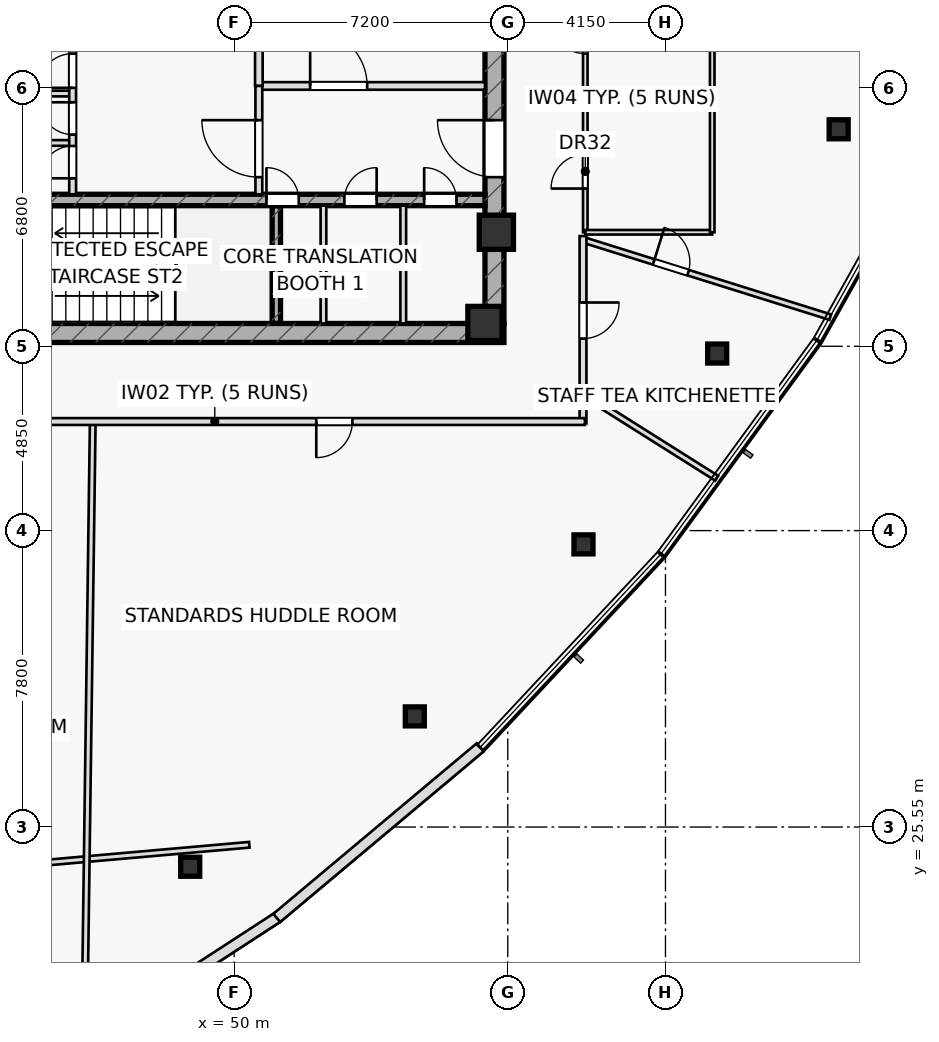
"""IFC4 building model, lengths in metres.
Left out: names, types, materials, properties, quantities, classifications, styles, units other than length and angle.
Written with IfcOpenShell. Run it as: python <this file> out.ifc"""

import sys

from ifc_helpers import new_model, si_unit, direction, frame, frame_2d, origin, origin_2d, place, context, subcontext, project, spatial, rectangle, hollow_rectangle, extrude, element, fill, save


model = new_model("IFC4")
c1 = context("Model", 3, precision=1e-05, world=origin(), true_north=direction((0.0, 1.0)))
c2 = subcontext(c1, "Body", "Model", "MODEL_VIEW")
j1 = project(units=[si_unit("LENGTHUNIT", "METRE"), si_unit("PLANEANGLEUNIT", "RADIAN")], contexts=[c1])
p1 = place(None, origin())
s1 = spatial("IfcSite", under=j1, at=p1, CompositionType="ELEMENT")
p2 = place(p1, origin())
s2 = spatial("IfcBuilding", under=s1, at=p2, CompositionType="ELEMENT")
p3 = place(p2, frame((0.0, 0.0, 253.75)))
s3 = spatial("IfcBuildingStorey", under=s2, at=p3, CompositionType="ELEMENT", Elevation=253.75)
p4 = place(p3, frame((51.11, 38.8, 0.0), z_axis=(0.0, 0.0, 1.0), x_axis=(0.0, 1.0, 0.0)))
e1 = element("IfcWall", 1, at=p4, inside=s3, PredefinedType="SHEAR", context=c2, shape_type="SweptSolid", body=[
    extrude(rectangle(XDim=3.1, YDim=0.22, at=frame_2d((1.55, 0.0))), origin(), (0.0, 0.0, 1.0), 3.65),
])
p5 = place(p3, frame((42.9, 38.55, 0.0), z_axis=(0.0, 0.0, 1.0), x_axis=(1.0, 0.0, 0.0)))
e2 = element("IfcWall", 2, at=p5, inside=s3, PredefinedType="SHEAR", context=c2, shape_type="SweptSolid", body=[
    extrude(rectangle(XDim=14.2, YDim=0.5, at=frame_2d((7.1, 0.0))), origin(), (0.0, 0.0, 1.0), 3.65),
])
p6 = place(p5, frame((0.78, 0.0, 0.0)))
e3 = element("IfcOpeningElement", 3, at=p6, cuts=e2, PredefinedType="OPENING", context=c2, shape_type="SweptSolid", body=[
    extrude(rectangle(XDim=1.05, YDim=2.2, at=frame_2d((0.525, 1.1))), frame((0.0, 0.26, 0.0), z_axis=(0.0, -1.0, 0.0), x_axis=(1.0, 0.0, 0.0)), (0.0, 0.0, 1.0), 0.52),
])
p7 = place(p3, frame((56.85, 38.8, 0.0), z_axis=(0.0, 0.0, 1.0), x_axis=(0.0, 1.0, 0.0)))
e4 = element("IfcWall", 4, at=p7, inside=s3, PredefinedType="SHEAR", context=c2, shape_type="SweptSolid", body=[
    extrude(rectangle(XDim=12.4, YDim=0.5, at=frame_2d((6.2, 0.0))), origin(), (0.0, 0.0, 1.0), 3.65),
])
p8 = place(p7, frame((3.85, 0.0, 0.0)))
e5 = element("IfcOpeningElement", 5, at=p8, cuts=e4, PredefinedType="OPENING", context=c2, shape_type="SweptSolid", body=[
    extrude(rectangle(XDim=1.5, YDim=2.2, at=frame_2d((0.75, 1.1))), frame((0.0, 0.26, 0.0), z_axis=(0.0, -1.0, 0.0), x_axis=(1.0, 0.0, 0.0)), (0.0, 0.0, 1.0), 0.52),
])
p9 = place(p3, frame((43.4, 42.05, 0.0), z_axis=(0.0, 0.0, 1.0), x_axis=(1.0, 0.0, 0.0)))
e6 = element("IfcWall", 6, at=p9, inside=s3, PredefinedType="SHEAR", context=c2, shape_type="SweptSolid", body=[
    extrude(rectangle(XDim=13.2, YDim=0.3, at=frame_2d((6.6, 0.0))), origin(), (0.0, 0.0, 1.0), 3.65),
])
p10 = place(p9, frame((7.45, 0.0, 0.0)))
e7 = element("IfcOpeningElement", 7, at=p10, cuts=e6, PredefinedType="OPENING", context=c2, shape_type="SweptSolid", body=[
    extrude(rectangle(XDim=0.85, YDim=2.05, at=frame_2d((0.425, 1.025))), frame((0.0, 0.16, 0.0), z_axis=(0.0, -1.0, 0.0), x_axis=(1.0, 0.0, 0.0)), (0.0, 0.0, 1.0), 0.32),
])
p11 = place(p9, frame((9.5, 0.0, 0.0)))
e8 = element("IfcOpeningElement", 8, at=p11, cuts=e6, PredefinedType="OPENING", context=c2, shape_type="SweptSolid", body=[
    extrude(rectangle(XDim=0.85, YDim=2.05, at=frame_2d((0.425, 1.025))), frame((0.0, 0.16, 0.0), z_axis=(0.0, -1.0, 0.0), x_axis=(1.0, 0.0, 0.0)), (0.0, 0.0, 1.0), 0.32),
])
p12 = place(p9, frame((11.6, 0.0, 0.0)))
e9 = element("IfcOpeningElement", 9, at=p12, cuts=e6, PredefinedType="OPENING", context=c2, shape_type="SweptSolid", body=[
    extrude(rectangle(XDim=0.85, YDim=2.05, at=frame_2d((0.425, 1.025))), frame((0.0, 0.16, 0.0), z_axis=(0.0, -1.0, 0.0), x_axis=(1.0, 0.0, 0.0)), (0.0, 0.0, 1.0), 0.32),
])
for number, where, z_axis, x_axis in (
    (10, (56.9, 41.2, 0.0), (0.0, 0.0, 1.0), (1.0, 0.0, 0.0)),
    (11, (56.6, 38.8, 0.0), (0.0, 0.0, 1.0), (1.0, 0.0, 0.0)),
):
    element("IfcColumn", number, at=place(p3, frame(where, z_axis=z_axis, x_axis=x_axis)), inside=s3, PredefinedType="COLUMN", context=c2, shape_type="SweptSolid", body=[
        extrude(rectangle(XDim=0.9, YDim=0.9, at=origin_2d()), origin(), (0.0, 0.0, 1.0), 3.65),
    ])
for number, where, z_axis, x_axis in (
    (12, (48.844, 24.505, 0.0), (0.0, 0.0, 1.0), (1.0, 0.0, 0.0)),
    (13, (54.754, 28.462, 0.0), (0.0, 0.0, 1.0), (1.0, 0.0, 0.0)),
    (14, (59.192, 32.987, 0.0), (0.0, 0.0, 1.0), (1.0, 0.0, 0.0)),
    (15, (62.711, 38.009, 0.0), (0.0, 0.0, 1.0), (1.0, 0.0, 0.0)),
    (16, (65.907, 43.909, 0.0), (0.0, 0.0, 1.0), (1.0, 0.0, 0.0)),
):
    element("IfcColumn", number, at=place(p3, frame(where, z_axis=z_axis, x_axis=x_axis)), inside=s3, PredefinedType="COLUMN", context=c2, shape_type="SweptSolid", body=[
        extrude(hollow_rectangle(XDim=0.5, YDim=0.5, WallThickness=0.03, at=origin_2d()), origin(), (0.0, 0.0, 1.0), 3.65),
    ])
p13 = place(p3, frame((50.65, 45.05, 0.0), z_axis=(0.0, 0.0, 1.0), x_axis=(1.0, 0.0, 0.0)))
e17 = element("IfcWall", 17, at=p13, inside=s3, PredefinedType="PARTITIONING", context=c2, shape_type="SweptSolid", body=[
    extrude(rectangle(XDim=5.95, YDim=0.2, at=frame_2d((2.975, 0.0))), origin(), (0.0, 0.0, 1.0), 3.65),
])
p14 = place(p13, frame((1.35, 0.0, 0.0)))
e18 = element("IfcOpeningElement", 18, at=p14, cuts=e17, PredefinedType="OPENING", context=c2, shape_type="SweptSolid", body=[
    extrude(rectangle(XDim=1.5, YDim=2.2, at=frame_2d((0.75, 1.1))), frame((0.0, 0.11, 0.0), z_axis=(0.0, -1.0, 0.0), x_axis=(1.0, 0.0, 0.0)), (0.0, 0.0, 1.0), 0.22),
])
p15 = place(p3, frame((50.65, 45.05, 0.0), z_axis=(0.0, 0.0, 1.0), x_axis=(0.0, 1.0, 0.0)))
e19 = element("IfcWall", 19, at=p15, inside=s3, PredefinedType="PARTITIONING", context=c2, shape_type="SweptSolid", body=[
    extrude(rectangle(XDim=2.75, YDim=0.2, at=frame_2d((1.375, 0.0))), origin(), (0.0, 0.0, 1.0), 3.65),
])
p16 = place(p3, frame((50.65, 42.2, 0.0), z_axis=(0.0, 0.0, 1.0), x_axis=(0.0, 1.0, 0.0)))
e20 = element("IfcWall", 20, at=p16, inside=s3, PredefinedType="PARTITIONING", context=c2, shape_type="SweptSolid", body=[
    extrude(rectangle(XDim=2.85, YDim=0.18, at=frame_2d((1.425, 0.0))), origin(), (0.0, 0.0, 1.0), 3.65),
])
p17 = place(p16, frame((0.45, 0.0, 0.0)))
e21 = element("IfcOpeningElement", 21, at=p17, cuts=e20, PredefinedType="OPENING", context=c2, shape_type="SweptSolid", body=[
    extrude(rectangle(XDim=1.5, YDim=2.2, at=frame_2d((0.75, 1.1))), frame((0.0, 0.1, 0.0), z_axis=(0.0, -1.0, 0.0), x_axis=(1.0, 0.0, 0.0)), (0.0, 0.0, 1.0), 0.2),
])
for number, where, z_axis, x_axis in (
    (22, (52.35, 38.8, 0.0), (0.0, 0.0, 1.0), (0.0, 1.0, 0.0)),
    (23, (54.45, 38.8, 0.0), (0.0, 0.0, 1.0), (0.0, 1.0, 0.0)),
):
    element("IfcWall", number, at=place(p3, frame(where, z_axis=z_axis, x_axis=x_axis)), inside=s3, PredefinedType="PARTITIONING", context=c2, shape_type="SweptSolid", body=[
        extrude(rectangle(XDim=3.1, YDim=0.15, at=frame_2d((1.55, 0.0))), origin(), (0.0, 0.0, 1.0), 3.65),
    ])
for number, where, z_axis, x_axis in (
    (24, (43.4, 43.55, 0.0), (0.0, 0.0, 1.0), (1.0, 0.0, 0.0)),
    (25, (43.4, 44.85, 0.0), (0.0, 0.0, 1.0), (1.0, 0.0, 0.0)),
):
    element("IfcWall", number, at=place(p3, frame(where, z_axis=z_axis, x_axis=x_axis)), inside=s3, PredefinedType="PARTITIONING", context=c2, shape_type="SweptSolid", body=[
        extrude(rectangle(XDim=2.35, YDim=0.15, at=frame_2d((1.175, 0.0))), origin(), (0.0, 0.0, 1.0), 3.65),
    ])
p18 = place(p3, frame((45.75, 42.2, 0.0), z_axis=(0.0, 0.0, 1.0), x_axis=(0.0, 1.0, 0.0)))
e26 = element("IfcWall", 26, at=p18, inside=s3, PredefinedType="PARTITIONING", context=c2, shape_type="SweptSolid", body=[
    extrude(rectangle(XDim=5.6, YDim=0.18, at=frame_2d((2.8, 0.0))), origin(), (0.0, 0.0, 1.0), 3.65),
])
p19 = place(p18, frame((0.42, 0.0, 0.0)))
e27 = element("IfcOpeningElement", 27, at=p19, cuts=e26, PredefinedType="OPENING", context=c2, shape_type="SweptSolid", body=[
    extrude(rectangle(XDim=0.85, YDim=2.05, at=frame_2d((0.425, 1.025))), frame((0.0, 0.1, 0.0), z_axis=(0.0, -1.0, 0.0), x_axis=(1.0, 0.0, 0.0)), (0.0, 0.0, 1.0), 0.2),
])
p20 = place(p18, frame((1.57, 0.0, 0.0)))
e28 = element("IfcOpeningElement", 28, at=p20, cuts=e26, PredefinedType="OPENING", context=c2, shape_type="SweptSolid", body=[
    extrude(rectangle(XDim=0.85, YDim=2.05, at=frame_2d((0.425, 1.025))), frame((0.0, 0.1, 0.0), z_axis=(0.0, -1.0, 0.0), x_axis=(1.0, 0.0, 0.0)), (0.0, 0.0, 1.0), 0.2),
])
p21 = place(p18, frame((2.8, 0.0, 0.0)))
e29 = element("IfcOpeningElement", 29, at=p21, cuts=e26, PredefinedType="OPENING", context=c2, shape_type="SweptSolid", body=[
    extrude(rectangle(XDim=0.9, YDim=2.05, at=frame_2d((0.45, 1.025))), frame((0.0, 0.1, 0.0), z_axis=(0.0, -1.0, 0.0), x_axis=(1.0, 0.0, 0.0)), (0.0, 0.0, 1.0), 0.2),
])
p22 = place(p3, frame((39.808, 24.152, 0.0), z_axis=(0.0, 0.0, 1.0), x_axis=(0.996153584085, 0.087624408208, 0.0)))
e30 = element("IfcWall", 30, at=p22, inside=s3, PredefinedType="PARTITIONING", context=c2, shape_type="SweptSolid", body=[
    extrude(rectangle(XDim=10.632, YDim=0.15, at=frame_2d((5.316, 0.0))), origin(), (0.0, 0.0, 1.0), 3.175),
])
p23 = place(p3, frame((59.24, 41.2, 0.0), z_axis=(0.0, 0.0, 1.0), x_axis=(0.0, 1.0, 0.0)))
e31 = element("IfcWall", 31, at=p23, inside=s3, PredefinedType="PARTITIONING", context=c2, shape_type="SweptSolid", body=[
    extrude(rectangle(XDim=7.0, YDim=0.12, at=frame_2d((3.5, 0.0))), origin(), (0.0, 0.0, 1.0), 3.65),
])
p24 = place(p23, frame((1.15, 0.0, 0.0)))
e32 = element("IfcOpeningElement", 32, at=p24, cuts=e31, PredefinedType="OPENING", context=c2, shape_type="SweptSolid", body=[
    extrude(rectangle(XDim=0.9, YDim=2.05, at=frame_2d((0.45, 1.025))), frame((0.0, 0.07, 0.0), z_axis=(0.0, -1.0, 0.0), x_axis=(1.0, 0.0, 0.0)), (0.0, 0.0, 1.0), 0.14),
])
p25 = place(p23, frame((4.7, 0.0, 0.0)))
e33 = element("IfcOpeningElement", 33, at=p25, cuts=e31, PredefinedType="OPENING", context=c2, shape_type="SweptSolid", body=[
    extrude(rectangle(XDim=0.9, YDim=2.05, at=frame_2d((0.45, 1.025))), frame((0.0, 0.07, 0.0), z_axis=(0.0, -1.0, 0.0), x_axis=(1.0, 0.0, 0.0)), (0.0, 0.0, 1.0), 0.14),
])
p26 = place(p3, frame((59.24, 41.2, 0.0), z_axis=(0.0, 0.0, 1.0), x_axis=(1.0, 0.0, 0.0)))
e34 = element("IfcWall", 34, at=p26, inside=s3, PredefinedType="PARTITIONING", context=c2, shape_type="SweptSolid", body=[
    extrude(rectangle(XDim=3.34, YDim=0.12, at=frame_2d((1.67, 0.0))), origin(), (0.0, 0.0, 1.0), 3.075),
])
p27 = place(p3, frame((59.24, 44.65, 0.0), z_axis=(0.0, 0.0, 1.0), x_axis=(1.0, 0.0, 0.0)))
e35 = element("IfcWall", 35, at=p27, inside=s3, PredefinedType="PARTITIONING", context=c2, shape_type="SweptSolid", body=[
    extrude(rectangle(XDim=3.34, YDim=0.12, at=frame_2d((1.67, 0.0))), origin(), (0.0, 0.0, 1.0), 3.65),
])
p28 = place(p3, frame((62.58, 41.2, 0.0), z_axis=(0.0, 0.0, 1.0), x_axis=(0.0, 1.0, 0.0)))
e36 = element("IfcWall", 36, at=p28, inside=s3, PredefinedType="PARTITIONING", context=c2, shape_type="SweptSolid", body=[
    extrude(rectangle(XDim=7.0, YDim=0.12, at=frame_2d((3.5, 0.0))), origin(), (0.0, 0.0, 1.0), 3.355),
])
p29 = place(p3, frame((46.279, 36.22, 0.0), z_axis=(0.0, 0.0, 1.0), x_axis=(-0.013739844255, -0.999905603885, 0.0)))
e37 = element("IfcWall", 37, at=p29, inside=s3, PredefinedType="PARTITIONING", context=c2, shape_type="SweptSolid", body=[
    extrude(rectangle(XDim=16.365, YDim=0.15, at=frame_2d((8.183, 0.0))), origin(), (0.0, 0.0, 1.0), 3.075),
])
p30 = place(p3, frame((59.18, 36.946, 0.0), z_axis=(0.0, 0.0, 1.0), x_axis=(0.84600332898, -0.533177613329, 0.0)))
e38 = element("IfcWall", 38, at=p30, inside=s3, PredefinedType="PARTITIONING", context=c2, shape_type="SweptSolid", body=[
    extrude(rectangle(XDim=4.158, YDim=0.15, at=frame_2d((2.079, 0.0))), origin(), (0.0, 0.0, 1.0), 3.175),
])
p31 = place(p3, frame((59.18, 41.002, 0.0), z_axis=(0.0, 0.0, 1.0), x_axis=(0.95438306304, -0.298584944332, 0.0)))
e39 = element("IfcWall", 39, at=p31, inside=s3, PredefinedType="PARTITIONING", context=c2, shape_type="SweptSolid", body=[
    extrude(rectangle(XDim=6.817, YDim=0.15, at=frame_2d((3.408, 0.0))), origin(), (0.0, 0.0, 1.0), 3.075),
])
p32 = place(p31, frame((1.95, 0.0, 0.0)))
e40 = element("IfcOpeningElement", 40, at=p32, cuts=e39, PredefinedType="OPENING", context=c2, shape_type="SweptSolid", body=[
    extrude(rectangle(XDim=0.95, YDim=2.05, at=frame_2d((0.475, 1.025))), frame((0.0, 0.085, 0.0), z_axis=(0.0, -1.0, 0.0), x_axis=(1.0, 0.0, 0.0)), (0.0, 0.0, 1.0), 0.17),
])
p33 = place(p3, frame((59.18, 41.1, 0.0), z_axis=(0.0, 0.0, 1.0), x_axis=(0.0, -1.0, 0.0)))
e41 = element("IfcWall", 41, at=p33, inside=s3, PredefinedType="PARTITIONING", context=c2, shape_type="SweptSolid", body=[
    extrude(rectangle(XDim=4.93, YDim=0.18, at=frame_2d((2.465, 0.0))), origin(), (0.0, 0.0, 1.0), 3.355),
])
p34 = place(p33, frame((1.748, 0.0, 0.0)))
e42 = element("IfcOpeningElement", 42, at=p34, cuts=e41, PredefinedType="OPENING", context=c2, shape_type="SweptSolid", body=[
    extrude(rectangle(XDim=0.95, YDim=2.05, at=frame_2d((0.475, 1.025))), frame((0.0, 0.1, 0.0), z_axis=(0.0, -1.0, 0.0), x_axis=(1.0, 0.0, 0.0)), (0.0, 0.0, 1.0), 0.2),
])
p35 = place(p3, frame((59.23, 36.22, 0.0), z_axis=(0.0, 0.0, 1.0), x_axis=(-1.0, 0.0, 0.0)))
e43 = element("IfcWall", 43, at=p35, inside=s3, PredefinedType="PARTITIONING", context=c2, shape_type="SweptSolid", body=[
    extrude(rectangle(XDim=19.48, YDim=0.18, at=frame_2d((9.74, 0.0))), origin(), (0.0, 0.0, 1.0), 3.075),
])
p36 = place(p35, frame((6.119, 0.0, 0.0)))
e44 = element("IfcOpeningElement", 44, at=p36, cuts=e43, PredefinedType="OPENING", context=c2, shape_type="SweptSolid", body=[
    extrude(rectangle(XDim=0.95, YDim=2.05, at=frame_2d((0.475, 1.025))), frame((0.0, 0.1, 0.0), z_axis=(0.0, -1.0, 0.0), x_axis=(1.0, 0.0, 0.0)), (0.0, 0.0, 1.0), 0.2),
])
p37 = place(p35, frame((14.639, 0.0, 0.0)))
e45 = element("IfcOpeningElement", 45, at=p37, cuts=e43, PredefinedType="OPENING", context=c2, shape_type="SweptSolid", body=[
    extrude(rectangle(XDim=0.95, YDim=2.05, at=frame_2d((0.475, 1.025))), frame((0.0, 0.1, 0.0), z_axis=(0.0, -1.0, 0.0), x_axis=(1.0, 0.0, 0.0)), (0.0, 0.0, 1.0), 0.2),
])
p38 = place(p35, frame((17.795, 0.0, 0.0)))
e46 = element("IfcOpeningElement", 46, at=p38, cuts=e43, PredefinedType="OPENING", context=c2, shape_type="SweptSolid", body=[
    extrude(rectangle(XDim=0.95, YDim=2.05, at=frame_2d((0.475, 1.025))), frame((0.0, 0.1, 0.0), z_axis=(0.0, -1.0, 0.0), x_axis=(1.0, 0.0, 0.0)), (0.0, 0.0, 1.0), 0.2),
])
p39 = place(p3, frame((45.278, 19.364, 0.0), z_axis=(0.0, 0.0, 1.0), x_axis=(0.838435644582, 0.545000614581, 0.0)))
e47 = element("IfcWall", 47, at=p39, inside=s3, PredefinedType="STANDARD", context=c2, shape_type="SweptSolid", body=[
    extrude(rectangle(XDim=6.997, YDim=0.28, at=frame_2d((3.499, 0.0))), origin(), (0.0, 0.0, 1.0), 3.65),
])
p40 = place(p3, frame((51.121, 23.159, 0.0), z_axis=(0.0, 0.0, 1.0), x_axis=(0.766321422368, 0.642457374166, 0.0)))
e48 = element("IfcWall", 48, at=p40, inside=s3, PredefinedType="STANDARD", context=c2, shape_type="SweptSolid", body=[
    extrude(rectangle(XDim=6.985, YDim=0.28, at=frame_2d((3.493, 0.0))), origin(), (0.0, 0.0, 1.0), 3.65),
])
p41 = place(p8, origin())
e49 = element("IfcDoor", 49, at=p41, inside=s3, OperationType="SINGLE_SWING_RIGHT", PredefinedType="DOOR", context=c2, shape_type="SweptSolid", body=[
    extrude(rectangle(XDim=1.5, YDim=2.2, at=frame_2d((0.75, 1.1))), frame((0.0, 0.025, 0.0), z_axis=(0.0, -1.0, 0.0), x_axis=(1.0, 0.0, 0.0)), (0.0, 0.0, 1.0), 0.05),
])
fill(e5, e49)
p42 = place(p14, origin())
e50 = element("IfcDoor", 50, at=p42, inside=s3, OperationType="SINGLE_SWING_LEFT", PredefinedType="DOOR", context=c2, shape_type="SweptSolid", body=[
    extrude(rectangle(XDim=1.5, YDim=2.2, at=frame_2d((0.75, 1.1))), frame((0.0, 0.025, 0.0), z_axis=(0.0, -1.0, 0.0), x_axis=(1.0, 0.0, 0.0)), (0.0, 0.0, 1.0), 0.05),
])
fill(e18, e50)
p43 = place(p17, origin())
e51 = element("IfcDoor", 51, at=p43, inside=s3, OperationType="SINGLE_SWING_RIGHT", PredefinedType="DOOR", context=c2, shape_type="SweptSolid", body=[
    extrude(rectangle(XDim=1.5, YDim=2.2, at=frame_2d((0.75, 1.1))), frame((0.0, 0.025, 0.0), z_axis=(0.0, -1.0, 0.0), x_axis=(1.0, 0.0, 0.0)), (0.0, 0.0, 1.0), 0.05),
])
fill(e21, e51)
p44 = place(p10, origin())
e52 = element("IfcDoor", 52, at=p44, inside=s3, OperationType="SINGLE_SWING_LEFT", PredefinedType="DOOR", context=c2, shape_type="SweptSolid", body=[
    extrude(rectangle(XDim=0.85, YDim=2.05, at=frame_2d((0.425, 1.025))), frame((0.0, 0.025, 0.0), z_axis=(0.0, -1.0, 0.0), x_axis=(1.0, 0.0, 0.0)), (0.0, 0.0, 1.0), 0.05),
])
fill(e7, e52)
p45 = place(p11, origin())
e53 = element("IfcDoor", 53, at=p45, inside=s3, OperationType="SINGLE_SWING_RIGHT", PredefinedType="DOOR", context=c2, shape_type="SweptSolid", body=[
    extrude(rectangle(XDim=0.85, YDim=2.05, at=frame_2d((0.425, 1.025))), frame((0.0, 0.025, 0.0), z_axis=(0.0, -1.0, 0.0), x_axis=(1.0, 0.0, 0.0)), (0.0, 0.0, 1.0), 0.05),
])
fill(e8, e53)
p46 = place(p12, origin())
e54 = element("IfcDoor", 54, at=p46, inside=s3, OperationType="SINGLE_SWING_LEFT", PredefinedType="DOOR", context=c2, shape_type="SweptSolid", body=[
    extrude(rectangle(XDim=0.85, YDim=2.05, at=frame_2d((0.425, 1.025))), frame((0.0, 0.025, 0.0), z_axis=(0.0, -1.0, 0.0), x_axis=(1.0, 0.0, 0.0)), (0.0, 0.0, 1.0), 0.05),
])
fill(e9, e54)
p47 = place(p19, origin())
e55 = element("IfcDoor", 55, at=p47, inside=s3, OperationType="SINGLE_SWING_LEFT", PredefinedType="DOOR", context=c2, shape_type="SweptSolid", body=[
    extrude(rectangle(XDim=0.85, YDim=2.05, at=frame_2d((0.425, 1.025))), frame((0.0, 0.025, 0.0), z_axis=(0.0, -1.0, 0.0), x_axis=(1.0, 0.0, 0.0)), (0.0, 0.0, 1.0), 0.05),
])
fill(e27, e55)
p48 = place(p20, origin())
e56 = element("IfcDoor", 56, at=p48, inside=s3, OperationType="SINGLE_SWING_RIGHT", PredefinedType="DOOR", context=c2, shape_type="SweptSolid", body=[
    extrude(rectangle(XDim=0.85, YDim=2.05, at=frame_2d((0.425, 1.025))), frame((0.0, 0.025, 0.0), z_axis=(0.0, -1.0, 0.0), x_axis=(1.0, 0.0, 0.0)), (0.0, 0.0, 1.0), 0.05),
])
fill(e28, e56)
p49 = place(p21, origin())
e57 = element("IfcDoor", 57, at=p49, inside=s3, OperationType="SINGLE_SWING_LEFT", PredefinedType="DOOR", context=c2, shape_type="SweptSolid", body=[
    extrude(rectangle(XDim=0.9, YDim=2.05, at=frame_2d((0.45, 1.025))), frame((0.0, 0.025, 0.0), z_axis=(0.0, -1.0, 0.0), x_axis=(1.0, 0.0, 0.0)), (0.0, 0.0, 1.0), 0.05),
])
fill(e29, e57)
p50 = place(p24, origin())
e58 = element("IfcDoor", 58, at=p50, inside=s3, OperationType="SINGLE_SWING_LEFT", PredefinedType="DOOR", context=c2, shape_type="SweptSolid", body=[
    extrude(rectangle(XDim=0.9, YDim=2.05, at=frame_2d((0.45, 1.025))), frame((0.0, 0.025, 0.0), z_axis=(0.0, -1.0, 0.0), x_axis=(1.0, 0.0, 0.0)), (0.0, 0.0, 1.0), 0.05),
])
fill(e32, e58)
p51 = place(p25, origin())
e59 = element("IfcDoor", 59, at=p51, inside=s3, OperationType="SINGLE_SWING_RIGHT", PredefinedType="DOOR", context=c2, shape_type="SweptSolid", body=[
    extrude(rectangle(XDim=0.9, YDim=2.05, at=frame_2d((0.45, 1.025))), frame((0.0, 0.025, 0.0), z_axis=(0.0, -1.0, 0.0), x_axis=(1.0, 0.0, 0.0)), (0.0, 0.0, 1.0), 0.05),
])
fill(e33, e59)
p52 = place(p32, origin())
e60 = element("IfcDoor", 60, at=p52, inside=s3, OperationType="SINGLE_SWING_LEFT", PredefinedType="DOOR", context=c2, shape_type="SweptSolid", body=[
    extrude(rectangle(XDim=0.95, YDim=2.05, at=frame_2d((0.475, 1.025))), frame((0.0, 0.025, 0.0), z_axis=(0.0, -1.0, 0.0), x_axis=(1.0, 0.0, 0.0)), (0.0, 0.0, 1.0), 0.05),
])
fill(e40, e60)
p53 = place(p34, origin())
e61 = element("IfcDoor", 61, at=p53, inside=s3, OperationType="SINGLE_SWING_LEFT", PredefinedType="DOOR", context=c2, shape_type="SweptSolid", body=[
    extrude(rectangle(XDim=0.95, YDim=2.05, at=frame_2d((0.475, 1.025))), frame((0.0, 0.025, 0.0), z_axis=(0.0, -1.0, 0.0), x_axis=(1.0, 0.0, 0.0)), (0.0, 0.0, 1.0), 0.05),
])
fill(e42, e61)
p54 = place(p36, origin())
e62 = element("IfcDoor", 62, at=p54, inside=s3, OperationType="SINGLE_SWING_RIGHT", PredefinedType="DOOR", context=c2, shape_type="SweptSolid", body=[
    extrude(rectangle(XDim=0.95, YDim=2.05, at=frame_2d((0.475, 1.025))), frame((0.0, 0.025, 0.0), z_axis=(0.0, -1.0, 0.0), x_axis=(1.0, 0.0, 0.0)), (0.0, 0.0, 1.0), 0.05),
])
fill(e44, e62)
save(model, sys.argv[1])
